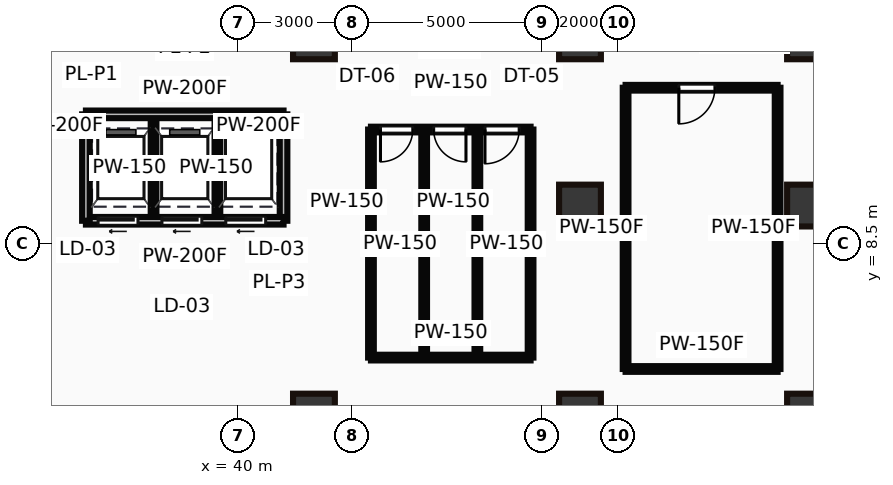
"""IFC4 building model, lengths in metres.
Left out: names, types, materials, properties, quantities, classifications, styles, units other than length and angle.
Written with IfcOpenShell. Run it as: python <this file> out.ifc"""

import sys

from ifc_helpers import new_model, si_unit, direction, frame, frame_2d, origin, origin_2d, place, context, subcontext, project, spatial, rectangle, hollow_rectangle, extrude, source, transform, mapped, element, fill, save


model = new_model("IFC4")
c1 = context("Model", 3, precision=1e-05, world=origin(), true_north=direction((0.0, 1.0)))
c2 = subcontext(c1, "Body", "Model", "MODEL_VIEW")
j1 = project(units=[si_unit("LENGTHUNIT", "METRE"), si_unit("PLANEANGLEUNIT", "RADIAN")], contexts=[c1])
p1 = place(None, origin())
s1 = spatial("IfcSite", under=j1, at=p1, CompositionType="ELEMENT")
p2 = place(p1, origin())
s2 = spatial("IfcBuilding", under=s1, at=p2, CompositionType="ELEMENT")
p3 = place(p2, frame((0.0, 0.0, 16.0)))
s3 = spatial("IfcBuildingStorey", under=s2, at=p3, CompositionType="ELEMENT", Elevation=16.0)
m1 = source(origin(), c2, "Body", "SweptSolid", [
    extrude(hollow_rectangle(XDim=1.1, YDim=1.3, WallThickness=0.055, at=origin_2d()), origin(), (0.0, 0.0, 1.0), 5.0),
])
for number, where, z_axis, x_axis in (
    (1, (42.0, 14.0, 0.0), (0.0, 0.0, 1.0), (1.0, 0.0, 0.0)),
    (2, (49.0, 14.0, 0.0), (0.0, 0.0, 1.0), (1.0, 0.0, 0.0)),
    (3, (55.0, 14.0, 0.0), (0.0, 0.0, 1.0), (1.0, 0.0, 0.0)),
):
    element("IfcColumn", number, at=place(p3, frame(where, z_axis=z_axis, x_axis=x_axis)), inside=s3, PredefinedType="PILASTER", context=c2, shape_type="MappedRepresentation", body=[
        mapped(m1, transform((0.0, 0.0, 0.0))),
    ])
m2 = source(origin(), c2, "Body", "SweptSolid", [
    extrude(hollow_rectangle(XDim=1.1, YDim=1.1, WallThickness=0.05, at=origin_2d()), origin(), (0.0, 0.0, 1.0), 5.0),
])
for number, where, z_axis, x_axis in (
    (4, (49.0, 9.5, 0.0), (0.0, 0.0, 1.0), (1.0, 0.0, 0.0)),
    (5, (55.0, 9.5, 0.0), (0.0, 0.0, 1.0), (1.0, 0.0, 0.0)),
    (6, (42.0, 4.0, 0.0), (0.0, 0.0, 1.0), (1.0, 0.0, 0.0)),
    (7, (49.0, 4.0, 0.0), (0.0, 0.0, 1.0), (1.0, 0.0, 0.0)),
    (8, (55.0, 4.0, 0.0), (0.0, 0.0, 1.0), (1.0, 0.0, 0.0)),
):
    element("IfcColumn", number, at=place(p3, frame(where, z_axis=z_axis, x_axis=x_axis)), inside=s3, PredefinedType="PILASTER", context=c2, shape_type="MappedRepresentation", body=[
        mapped(m2, transform((0.0, 0.0, 0.0))),
    ])
m3 = source(origin(), c2, "Body", "SweptSolid", [
    extrude(rectangle(XDim=5.2, YDim=0.2, at=frame_2d((2.6, 0.0))), origin(), (0.0, 0.0, 1.0), 4.7),
])
p4 = place(p3, frame((36.0, 9.1, 0.0), z_axis=(0.0, 0.0, 1.0), x_axis=(1.0, 0.0, 0.0)))
e9 = element("IfcWall", 9, at=p4, inside=s3, PredefinedType="PARTITIONING", context=c2, shape_type="MappedRepresentation", body=[
    mapped(m3, transform((0.0, 0.0, 0.0))),
])
p5 = place(p4, frame((0.32, 0.0, 0.0)))
e10 = element("IfcOpeningElement", 10, at=p5, cuts=e9, PredefinedType="OPENING", context=c2, shape_type="SweptSolid", body=[
    extrude(rectangle(XDim=1.05, YDim=2.15, at=frame_2d((0.525, 1.075))), frame((0.0, 0.11, 0.0), z_axis=(0.0, -1.0, 0.0), x_axis=(1.0, 0.0, 0.0)), (0.0, 0.0, 1.0), 0.22),
])
p6 = place(p4, frame((2.0, 0.0, 0.0)))
e11 = element("IfcOpeningElement", 11, at=p6, cuts=e9, PredefinedType="OPENING", context=c2, shape_type="SweptSolid", body=[
    extrude(rectangle(XDim=1.05, YDim=2.15, at=frame_2d((0.525, 1.075))), frame((0.0, 0.11, 0.0), z_axis=(0.0, -1.0, 0.0), x_axis=(1.0, 0.0, 0.0)), (0.0, 0.0, 1.0), 0.22),
])
p7 = place(p4, frame((3.68, 0.0, 0.0)))
e12 = element("IfcOpeningElement", 12, at=p7, cuts=e9, PredefinedType="OPENING", context=c2, shape_type="SweptSolid", body=[
    extrude(rectangle(XDim=1.05, YDim=2.15, at=frame_2d((0.525, 1.075))), frame((0.0, 0.11, 0.0), z_axis=(0.0, -1.0, 0.0), x_axis=(1.0, 0.0, 0.0)), (0.0, 0.0, 1.0), 0.22),
])
p8 = place(p3, frame((36.0, 11.9, 0.0), z_axis=(0.0, 0.0, 1.0), x_axis=(1.0, 0.0, 0.0)))
e13 = element("IfcWall", 13, at=p8, inside=s3, PredefinedType="PARTITIONING", context=c2, shape_type="MappedRepresentation", body=[
    mapped(m3, transform((0.0, 0.0, 0.0))),
])
m4 = source(origin(), c2, "Body", "SweptSolid", [
    extrude(rectangle(XDim=2.8, YDim=0.2, at=frame_2d((1.4, 0.0))), origin(), (0.0, 0.0, 1.0), 4.7),
])
for number, where, z_axis, x_axis in (
    (14, (36.0, 9.1, 0.0), (0.0, 0.0, 1.0), (0.0, 1.0, 0.0)),
    (15, (41.2, 9.1, 0.0), (0.0, 0.0, 1.0), (0.0, 1.0, 0.0)),
):
    element("IfcWall", number, at=place(p3, frame(where, z_axis=z_axis, x_axis=x_axis)), inside=s3, PredefinedType="PARTITIONING", context=c2, shape_type="MappedRepresentation", body=[
        mapped(m4, transform((0.0, 0.0, 0.0))),
    ])
m5 = source(origin(), c2, "Body", "SweptSolid", [
    extrude(rectangle(XDim=2.7, YDim=0.15, at=frame_2d((1.35, 0.0))), origin(), (0.0, 0.0, 1.0), 4.7),
])
for number, where, z_axis, x_axis in (
    (16, (37.78, 9.15, 0.0), (0.0, 0.0, 1.0), (0.0, 1.0, 0.0)),
    (17, (39.46, 9.15, 0.0), (0.0, 0.0, 1.0), (0.0, 1.0, 0.0)),
):
    element("IfcWall", number, at=place(p3, frame(where, z_axis=z_axis, x_axis=x_axis)), inside=s3, PredefinedType="PARTITIONING", context=c2, shape_type="MappedRepresentation", body=[
        mapped(m5, transform((0.0, 0.0, 0.0))),
    ])
m6 = source(origin(), c2, "Body", "SweptSolid", [
    extrude(rectangle(XDim=4.2, YDim=0.15, at=frame_2d((2.1, 0.0))), origin(), (0.0, 0.0, 1.0), 4.7),
])
p9 = place(p3, frame((43.5, 11.5, 0.0), z_axis=(0.0, 0.0, 1.0), x_axis=(1.0, 0.0, 0.0)))
e18 = element("IfcWall", 18, at=p9, inside=s3, PredefinedType="PARTITIONING", context=c2, shape_type="MappedRepresentation", body=[
    mapped(m6, transform((0.0, 0.0, 0.0))),
])
p10 = place(p9, frame((0.25, 0.0, 0.0)))
e19 = element("IfcOpeningElement", 19, at=p10, cuts=e18, PredefinedType="OPENING", context=c2, shape_type="SweptSolid", body=[
    extrude(rectangle(XDim=0.85, YDim=2.1, at=frame_2d((0.425, 1.05))), frame((0.0, 0.085, 0.0), z_axis=(0.0, -1.0, 0.0), x_axis=(1.0, 0.0, 0.0)), (0.0, 0.0, 1.0), 0.17),
])
p11 = place(p9, frame((1.65, 0.0, 0.0)))
e20 = element("IfcOpeningElement", 20, at=p11, cuts=e18, PredefinedType="OPENING", context=c2, shape_type="SweptSolid", body=[
    extrude(rectangle(XDim=0.85, YDim=2.1, at=frame_2d((0.425, 1.05))), frame((0.0, 0.085, 0.0), z_axis=(0.0, -1.0, 0.0), x_axis=(1.0, 0.0, 0.0)), (0.0, 0.0, 1.0), 0.17),
])
p12 = place(p9, frame((3.0, 0.0, 0.0)))
e21 = element("IfcOpeningElement", 21, at=p12, cuts=e18, PredefinedType="OPENING", context=c2, shape_type="SweptSolid", body=[
    extrude(rectangle(XDim=0.9, YDim=2.1, at=frame_2d((0.45, 1.05))), frame((0.0, 0.085, 0.0), z_axis=(0.0, -1.0, 0.0), x_axis=(1.0, 0.0, 0.0)), (0.0, 0.0, 1.0), 0.17),
])
p13 = place(p3, frame((43.5, 5.5, 0.0), z_axis=(0.0, 0.0, 1.0), x_axis=(1.0, 0.0, 0.0)))
e22 = element("IfcWall", 22, at=p13, inside=s3, PredefinedType="PARTITIONING", context=c2, shape_type="MappedRepresentation", body=[
    mapped(m6, transform((0.0, 0.0, 0.0))),
])
m7 = source(origin(), c2, "Body", "SweptSolid", [
    extrude(rectangle(XDim=6.0, YDim=0.15, at=frame_2d((3.0, 0.0))), origin(), (0.0, 0.0, 1.0), 4.7),
])
for number, where, z_axis, x_axis in (
    (23, (43.5, 5.5, 0.0), (0.0, 0.0, 1.0), (0.0, 1.0, 0.0)),
    (24, (47.7, 5.5, 0.0), (0.0, 0.0, 1.0), (0.0, 1.0, 0.0)),
    (25, (44.9, 5.5, 0.0), (0.0, 0.0, 1.0), (0.0, 1.0, 0.0)),
    (26, (46.3, 5.5, 0.0), (0.0, 0.0, 1.0), (0.0, 1.0, 0.0)),
):
    element("IfcWall", number, at=place(p3, frame(where, z_axis=z_axis, x_axis=x_axis)), inside=s3, PredefinedType="PARTITIONING", context=c2, shape_type="MappedRepresentation", body=[
        mapped(m7, transform((0.0, 0.0, 0.0))),
    ])
m8 = source(origin(), c2, "Body", "SweptSolid", [
    extrude(rectangle(XDim=4.0, YDim=0.15, at=frame_2d((2.0, 0.0))), origin(), (0.0, 0.0, 1.0), 4.7),
])
p14 = place(p3, frame((50.2, 12.6, 0.0), z_axis=(0.0, 0.0, 1.0), x_axis=(1.0, 0.0, 0.0)))
e27 = element("IfcWall", 27, at=p14, inside=s3, PredefinedType="PARTITIONING", context=c2, shape_type="MappedRepresentation", body=[
    mapped(m8, transform((0.0, 0.0, 0.0))),
])
p15 = place(p14, frame((1.4, 0.0, 0.0)))
e28 = element("IfcOpeningElement", 28, at=p15, cuts=e27, PredefinedType="OPENING", context=c2, shape_type="SweptSolid", body=[
    extrude(rectangle(XDim=0.95, YDim=2.15, at=frame_2d((0.475, 1.075))), frame((0.0, 0.085, 0.0), z_axis=(0.0, -1.0, 0.0), x_axis=(1.0, 0.0, 0.0)), (0.0, 0.0, 1.0), 0.17),
])
p16 = place(p3, frame((50.2, 5.2, 0.0), z_axis=(0.0, 0.0, 1.0), x_axis=(1.0, 0.0, 0.0)))
e29 = element("IfcWall", 29, at=p16, inside=s3, PredefinedType="PARTITIONING", context=c2, shape_type="MappedRepresentation", body=[
    mapped(m8, transform((0.0, 0.0, 0.0))),
])
m9 = source(origin(), c2, "Body", "SweptSolid", [
    extrude(rectangle(XDim=7.4, YDim=0.15, at=frame_2d((3.7, 0.0))), origin(), (0.0, 0.0, 1.0), 4.7),
])
for number, where, z_axis, x_axis in (
    (30, (50.2, 5.2, 0.0), (0.0, 0.0, 1.0), (0.0, 1.0, 0.0)),
    (31, (54.2, 5.2, 0.0), (0.0, 0.0, 1.0), (0.0, 1.0, 0.0)),
):
    element("IfcWall", number, at=place(p3, frame(where, z_axis=z_axis, x_axis=x_axis)), inside=s3, PredefinedType="PARTITIONING", context=c2, shape_type="MappedRepresentation", body=[
        mapped(m9, transform((0.0, 0.0, 0.0))),
    ])
m10 = source(origin(), c2, "Body", "SweptSolid", [
    extrude(rectangle(XDim=1.05, YDim=2.15, at=frame_2d((0.525, 1.075))), frame((0.0, 0.025, 0.0), z_axis=(0.0, -1.0, 0.0), x_axis=(1.0, 0.0, 0.0)), (0.0, 0.0, 1.0), 0.05),
])
p17 = place(p5, frame((1.05, 0.0, 0.0), z_axis=(0.0, 0.0, 1.0), x_axis=(-1.0, 0.0, 0.0)))
e32 = element("IfcDoor", 32, at=p17, inside=s3, OperationType="SLIDING_TO_LEFT", PredefinedType="DOOR", context=c2, shape_type="MappedRepresentation", body=[
    mapped(m10, transform((0.0, 0.0, 0.0))),
])
fill(e10, e32)
p18 = place(p6, frame((1.05, 0.0, 0.0), z_axis=(0.0, 0.0, 1.0), x_axis=(-1.0, 0.0, 0.0)))
e33 = element("IfcDoor", 33, at=p18, inside=s3, OperationType="SLIDING_TO_LEFT", PredefinedType="DOOR", context=c2, shape_type="MappedRepresentation", body=[
    mapped(m10, transform((0.0, 0.0, 0.0))),
])
fill(e11, e33)
p19 = place(p7, frame((1.05, 0.0, 0.0), z_axis=(0.0, 0.0, 1.0), x_axis=(-1.0, 0.0, 0.0)))
e34 = element("IfcDoor", 34, at=p19, inside=s3, OperationType="SLIDING_TO_LEFT", PredefinedType="DOOR", context=c2, shape_type="MappedRepresentation", body=[
    mapped(m10, transform((0.0, 0.0, 0.0))),
])
fill(e12, e34)
m11 = source(origin(), c2, "Body", "SweptSolid", [
    extrude(rectangle(XDim=0.85, YDim=2.1, at=frame_2d((0.425, 1.05))), frame((0.0, 0.025, 0.0), z_axis=(0.0, -1.0, 0.0), x_axis=(1.0, 0.0, 0.0)), (0.0, 0.0, 1.0), 0.05),
])
p20 = place(p10, frame((0.85, 0.0, 0.0), z_axis=(0.0, 0.0, 1.0), x_axis=(-1.0, 0.0, 0.0)))
e35 = element("IfcDoor", 35, at=p20, inside=s3, OperationType="SINGLE_SWING_LEFT", PredefinedType="DOOR", context=c2, shape_type="MappedRepresentation", body=[
    mapped(m11, transform((0.0, 0.0, 0.0))),
])
fill(e19, e35)
p21 = place(p11, frame((0.85, 0.0, 0.0), z_axis=(0.0, 0.0, 1.0), x_axis=(-1.0, 0.0, 0.0)))
e36 = element("IfcDoor", 36, at=p21, inside=s3, OperationType="SINGLE_SWING_RIGHT", PredefinedType="DOOR", context=c2, shape_type="MappedRepresentation", body=[
    mapped(m11, transform((0.0, 0.0, 0.0))),
])
fill(e20, e36)
m12 = source(origin(), c2, "Body", "SweptSolid", [
    extrude(rectangle(XDim=0.9, YDim=2.1, at=frame_2d((0.45, 1.05))), frame((0.0, 0.025, 0.0), z_axis=(0.0, -1.0, 0.0), x_axis=(1.0, 0.0, 0.0)), (0.0, 0.0, 1.0), 0.05),
])
p22 = place(p12, frame((0.9, 0.0, 0.0), z_axis=(0.0, 0.0, 1.0), x_axis=(-1.0, 0.0, 0.0)))
e37 = element("IfcDoor", 37, at=p22, inside=s3, OperationType="SINGLE_SWING_LEFT", PredefinedType="DOOR", context=c2, shape_type="MappedRepresentation", body=[
    mapped(m12, transform((0.0, 0.0, 0.0))),
])
fill(e21, e37)
m13 = source(origin(), c2, "Body", "SweptSolid", [
    extrude(rectangle(XDim=0.95, YDim=2.15, at=frame_2d((0.475, 1.075))), frame((0.0, 0.025, 0.0), z_axis=(0.0, -1.0, 0.0), x_axis=(1.0, 0.0, 0.0)), (0.0, 0.0, 1.0), 0.05),
])
p23 = place(p15, frame((0.95, 0.0, 0.0), z_axis=(0.0, 0.0, 1.0), x_axis=(-1.0, 0.0, 0.0)))
e38 = element("IfcDoor", 38, at=p23, inside=s3, OperationType="SINGLE_SWING_LEFT", PredefinedType="DOOR", context=c2, shape_type="MappedRepresentation", body=[
    mapped(m13, transform((0.0, 0.0, 0.0))),
])
fill(e28, e38)
save(model, sys.argv[1])
